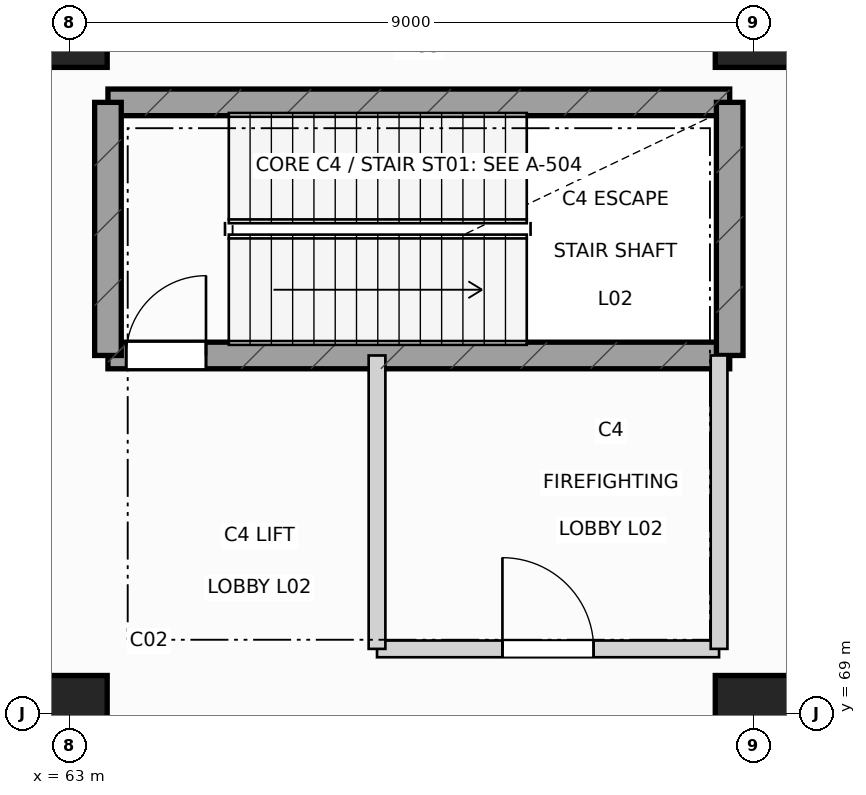
"""IFC4 building model, lengths in metres.
Left out: names, types, materials, properties, quantities, classifications, styles, units other than length and angle.
Written with IfcOpenShell. Run it as: python <this file> out.ifc"""

import sys

from ifc_helpers import new_model, si_unit, direction, frame, frame_2d, origin, origin_2d, place, context, subcontext, project, spatial, rectangle, extrude, element, fill, save


model = new_model("IFC4")
c1 = context("Model", 3, precision=1e-05, world=origin(), true_north=direction((0.0, 1.0)))
c2 = subcontext(c1, "Body", "Model", "MODEL_VIEW")
j1 = project(units=[si_unit("LENGTHUNIT", "METRE"), si_unit("PLANEANGLEUNIT", "RADIAN")], contexts=[c1])
p1 = place(None, origin())
s1 = spatial("IfcSite", under=j1, at=p1, CompositionType="ELEMENT")
p2 = place(p1, origin())
s2 = spatial("IfcBuilding", under=s1, at=p2, CompositionType="ELEMENT")
p3 = place(p2, frame((0.0, 0.0, 11.4)))
s3 = spatial("IfcBuildingStorey", under=s2, at=p3, CompositionType="ELEMENT", Elevation=11.4)
for number, where, z_axis, x_axis in (
    (1, (63.0, 69.0, 0.0), (0.0, 0.0, 1.0), (1.0, 0.0, 0.0)),
    (2, (63.0, 78.0, 0.0), (0.0, 0.0, 1.0), (1.0, 0.0, 0.0)),
    (3, (72.0, 69.0, 0.0), (0.0, 0.0, 1.0), (1.0, 0.0, 0.0)),
    (4, (72.0, 78.0, 0.0), (0.0, 0.0, 1.0), (1.0, 0.0, 0.0)),
):
    element("IfcColumn", number, at=place(p3, frame(where, z_axis=z_axis, x_axis=x_axis)), inside=s3, PredefinedType="COLUMN", context=c2, shape_type="SweptSolid", body=[
        extrude(rectangle(XDim=1.0, YDim=1.0, at=origin_2d()), origin(), (0.0, 0.0, 1.0), 5.4),
    ])
p4 = place(p3, frame((63.51, 73.71, 0.0), z_axis=(0.0, 0.0, 1.0), x_axis=(1.0, 0.0, 0.0)))
e5 = element("IfcWall", 5, at=p4, inside=s3, PredefinedType="SHEAR", context=c2, shape_type="SweptSolid", body=[
    extrude(rectangle(XDim=8.18, YDim=0.35, at=frame_2d((4.09, 0.0))), origin(), (0.0, 0.0, 1.0), 5.12),
])
p5 = place(p4, frame((0.24, 0.0, 0.0)))
e6 = element("IfcOpeningElement", 6, at=p5, cuts=e5, PredefinedType="OPENING", context=c2, shape_type="SweptSolid", body=[
    extrude(rectangle(XDim=1.05, YDim=2.18, at=frame_2d((0.525, 1.09))), frame((0.0, 0.185, 0.0), z_axis=(0.0, -1.0, 0.0), x_axis=(1.0, 0.0, 0.0)), (0.0, 0.0, 1.0), 0.37),
])
p6 = place(p3, frame((63.51, 77.04, 0.0), z_axis=(0.0, 0.0, 1.0), x_axis=(1.0, 0.0, 0.0)))
e7 = element("IfcWall", 7, at=p6, inside=s3, PredefinedType="SHEAR", context=c2, shape_type="SweptSolid", body=[
    extrude(rectangle(XDim=8.18, YDim=0.35, at=frame_2d((4.09, 0.0))), origin(), (0.0, 0.0, 1.0), 5.12),
])
for number, where, z_axis, x_axis in (
    (8, (63.51, 73.71, 0.0), (0.0, 0.0, 1.0), (0.0, 1.0, 0.0)),
    (9, (71.69, 73.71, 0.0), (0.0, 0.0, 1.0), (0.0, 1.0, 0.0)),
):
    element("IfcWall", number, at=place(p3, frame(where, z_axis=z_axis, x_axis=x_axis)), inside=s3, PredefinedType="SHEAR", context=c2, shape_type="SweptSolid", body=[
        extrude(rectangle(XDim=3.33, YDim=0.35, at=frame_2d((1.665, 0.0))), origin(), (0.0, 0.0, 1.0), 5.12),
    ])
p7 = place(p3, frame((67.05, 69.85, 0.0), z_axis=(0.0, 0.0, 1.0), x_axis=(1.0, 0.0, 0.0)))
e10 = element("IfcWall", 10, at=p7, inside=s3, PredefinedType="PARTITIONING", context=c2, shape_type="SweptSolid", body=[
    extrude(rectangle(XDim=4.5, YDim=0.22, at=frame_2d((2.25, 0.0))), origin(), (0.0, 0.0, 1.0), 4.585),
])
p8 = place(p7, frame((1.65, 0.0, 0.0)))
e11 = element("IfcOpeningElement", 11, at=p8, cuts=e10, PredefinedType="OPENING", context=c2, shape_type="SweptSolid", body=[
    extrude(rectangle(XDim=1.2, YDim=2.18, at=frame_2d((0.6, 1.09))), frame((0.0, 0.12, 0.0), z_axis=(0.0, -1.0, 0.0), x_axis=(1.0, 0.0, 0.0)), (0.0, 0.0, 1.0), 0.24),
])
p9 = place(p3, frame((67.05, 69.85, 0.0), z_axis=(0.0, 0.0, 1.0), x_axis=(0.0, 1.0, 0.0)))
e12 = element("IfcWall", 12, at=p9, inside=s3, PredefinedType="PARTITIONING", context=c2, shape_type="SweptSolid", body=[
    extrude(rectangle(XDim=3.86, YDim=0.22, at=frame_2d((1.93, 0.0))), origin(), (0.0, 0.0, 1.0), 4.635),
])
p10 = place(p3, frame((71.55, 69.85, 0.0), z_axis=(0.0, 0.0, 1.0), x_axis=(0.0, 1.0, 0.0)))
e13 = element("IfcWall", 13, at=p10, inside=s3, PredefinedType="PARTITIONING", context=c2, shape_type="SweptSolid", body=[
    extrude(rectangle(XDim=3.86, YDim=0.22, at=frame_2d((1.93, 0.0))), origin(), (0.0, 0.0, 1.0), 4.585),
])
p11 = place(p5, origin())
e14 = element("IfcDoor", 14, at=p11, inside=s3, OperationType="SINGLE_SWING_RIGHT", PredefinedType="DOOR", context=c2, shape_type="SweptSolid", body=[
    extrude(rectangle(XDim=1.05, YDim=2.18, at=frame_2d((0.525, 1.09))), frame((0.0, 0.025, 0.0), z_axis=(0.0, -1.0, 0.0), x_axis=(1.0, 0.0, 0.0)), (0.0, 0.0, 1.0), 0.05),
])
fill(e6, e14)
p12 = place(p8, origin())
e15 = element("IfcDoor", 15, at=p12, inside=s3, OperationType="SINGLE_SWING_LEFT", PredefinedType="DOOR", context=c2, shape_type="SweptSolid", body=[
    extrude(rectangle(XDim=1.2, YDim=2.18, at=frame_2d((0.6, 1.09))), frame((0.0, 0.025, 0.0), z_axis=(0.0, -1.0, 0.0), x_axis=(1.0, 0.0, 0.0)), (0.0, 0.0, 1.0), 0.05),
])
fill(e11, e15)
save(model, sys.argv[1])
